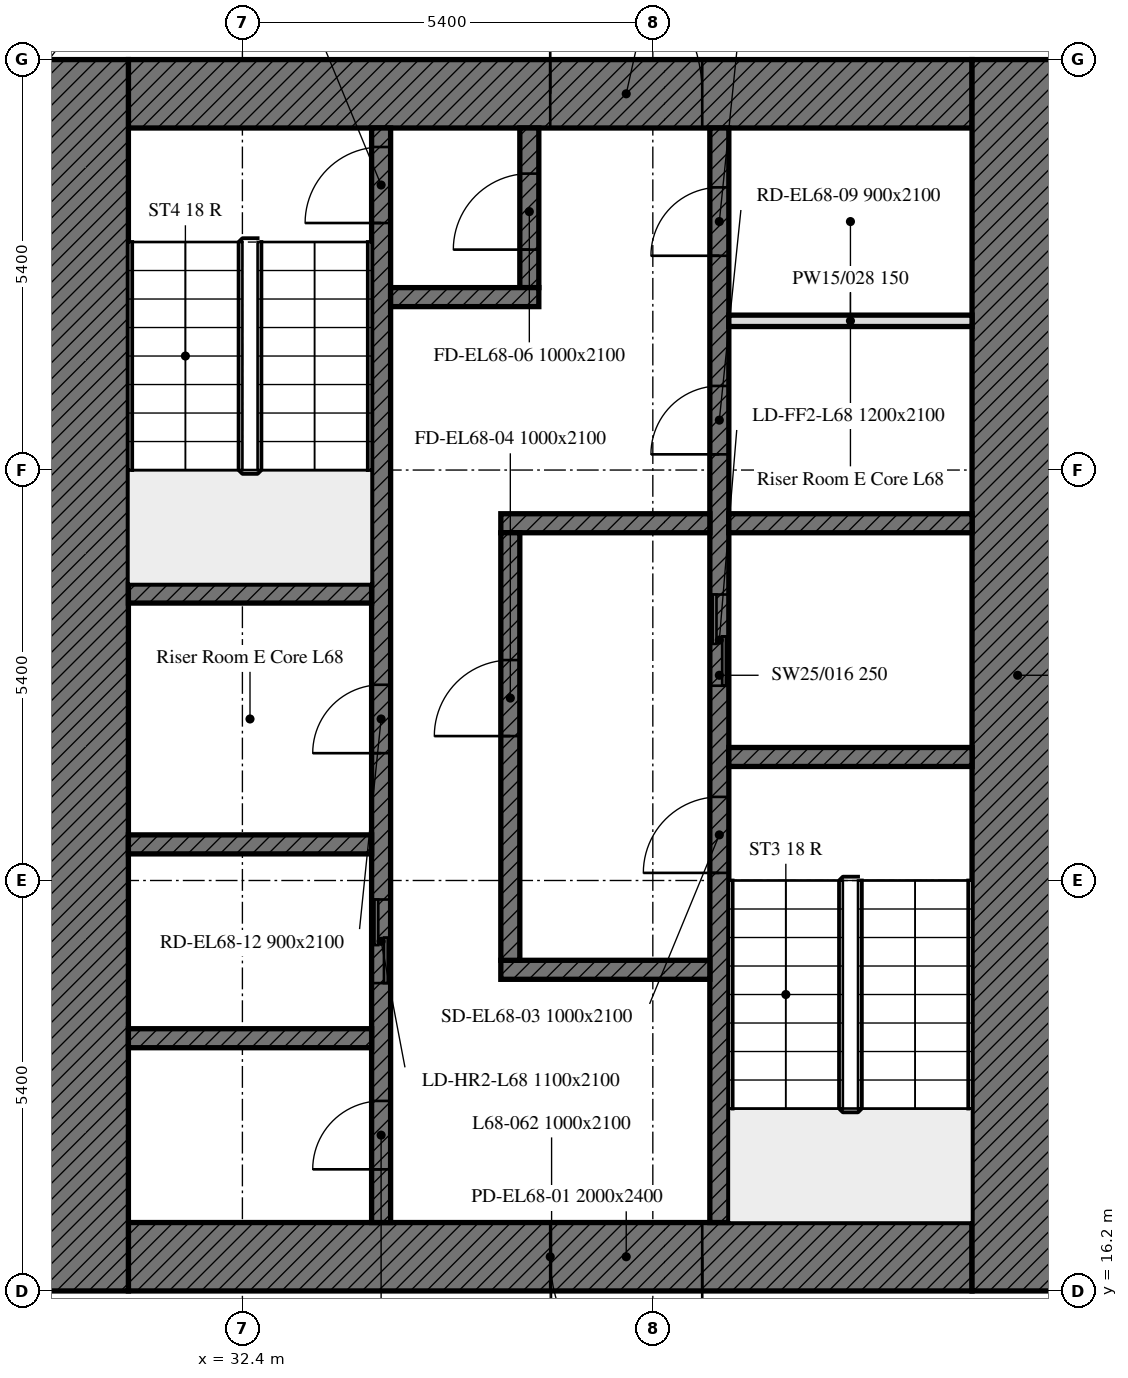
"""IFC4 building model, lengths in metres.
Left out: names, types, materials, properties, quantities, classifications, styles, units other than length and angle.
Written with IfcOpenShell. Run it as: python <this file> out.ifc"""

import sys

from ifc_helpers import new_model, si_unit, direction, frame, frame_2d, origin, place, context, subcontext, project, spatial, rectangle, extrude, element, fill, save


model = new_model("IFC4")
c1 = context("Model", 3, precision=1e-05, world=origin(), true_north=direction((0.0, 1.0)))
c2 = subcontext(c1, "Body", "Model", "MODEL_VIEW")
j1 = project(units=[si_unit("LENGTHUNIT", "METRE"), si_unit("PLANEANGLEUNIT", "RADIAN")], contexts=[c1])
p1 = place(None, origin())
s1 = spatial("IfcSite", under=j1, at=p1, CompositionType="ELEMENT")
p2 = place(p1, origin())
s2 = spatial("IfcBuilding", under=s1, at=p2, CompositionType="ELEMENT")
p3 = place(p2, frame((0.0, 0.0, 278.5)))
s3 = spatial("IfcBuildingStorey", under=s2, at=p3, CompositionType="ELEMENT", Elevation=278.5)
p4 = place(p3, frame((42.0, 16.65, 0.0), z_axis=(0.0, 0.0, 1.0), x_axis=(-1.0, 0.0, 0.0)))
e1 = element("IfcWall", 1, at=p4, inside=s3, PredefinedType="SOLIDWALL", context=c2, shape_type="SweptSolid", body=[
    extrude(rectangle(XDim=11.1, YDim=0.9, at=frame_2d((5.55, 0.0))), origin(), (0.0, 0.0, 1.0), 3.0),
])
p5 = place(p4, frame((3.55, 0.0, 0.0)))
e2 = element("IfcOpeningElement", 2, at=p5, cuts=e1, PredefinedType="OPENING", context=c2, shape_type="SweptSolid", body=[
    extrude(rectangle(XDim=2.0, YDim=2.4, at=frame_2d((1.0, 1.2))), frame((0.0, 0.45, 0.0), z_axis=(0.0, -1.0, 0.0), x_axis=(1.0, 0.0, 0.0)), (0.0, 0.0, 1.0), 0.9),
])
p6 = place(p3, frame((30.9, 31.95, 0.0), z_axis=(0.0, 0.0, 1.0), x_axis=(1.0, 0.0, 0.0)))
e3 = element("IfcWall", 3, at=p6, inside=s3, PredefinedType="SOLIDWALL", context=c2, shape_type="SweptSolid", body=[
    extrude(rectangle(XDim=11.1, YDim=0.9, at=frame_2d((5.55, 0.0))), origin(), (0.0, 0.0, 1.0), 3.0),
])
p7 = place(p6, frame((5.55, 0.0, 0.0)))
e4 = element("IfcOpeningElement", 4, at=p7, cuts=e3, PredefinedType="OPENING", context=c2, shape_type="SweptSolid", body=[
    extrude(rectangle(XDim=2.0, YDim=2.4, at=frame_2d((1.0, 1.2))), frame((0.0, 0.45, 0.0), z_axis=(0.0, -1.0, 0.0), x_axis=(1.0, 0.0, 0.0)), (0.0, 0.0, 1.0), 0.9),
])
for number, where, z_axis, x_axis in (
    (5, (42.6, 32.4, 0.0), (0.0, 0.0, 1.0), (0.0, -1.0, 0.0)),
    (6, (30.3, 16.2, 0.0), (0.0, 0.0, 1.0), (0.0, 1.0, 0.0)),
):
    element("IfcWall", number, at=place(p3, frame(where, z_axis=z_axis, x_axis=x_axis)), inside=s3, PredefinedType="SOLIDWALL", context=c2, shape_type="SweptSolid", body=[
        extrude(rectangle(XDim=16.2, YDim=1.2, at=frame_2d((8.1, 0.0))), origin(), (0.0, 0.0, 1.0), 3.0),
    ])
p8 = place(p3, frame((38.675, 17.1, 0.0), z_axis=(0.0, 0.0, 1.0), x_axis=(0.0, 1.0, 0.0)))
e7 = element("IfcWall", 7, at=p8, inside=s3, PredefinedType="SOLIDWALL", context=c2, shape_type="SweptSolid", body=[
    extrude(rectangle(XDim=14.4, YDim=0.25, at=frame_2d((7.2, 0.0))), origin(), (0.0, 0.0, 1.0), 3.0),
])
p9 = place(p8, frame((4.6, 0.0, 0.0)))
e8 = element("IfcOpeningElement", 8, at=p9, cuts=e7, PredefinedType="OPENING", context=c2, shape_type="SweptSolid", body=[
    extrude(rectangle(XDim=1.0, YDim=2.1, at=frame_2d((0.5, 1.05))), frame((0.0, 0.125, 0.0), z_axis=(0.0, -1.0, 0.0), x_axis=(1.0, 0.0, 0.0)), (0.0, 0.0, 1.0), 0.25),
])
p10 = place(p8, frame((7.062, 0.0, 0.0)))
e9 = element("IfcOpeningElement", 9, at=p10, cuts=e7, PredefinedType="OPENING", context=c2, shape_type="SweptSolid", body=[
    extrude(rectangle(XDim=1.2, YDim=2.1, at=frame_2d((0.6, 1.05))), frame((0.0, 0.125, 0.0), z_axis=(0.0, -1.0, 0.0), x_axis=(1.0, 0.0, 0.0)), (0.0, 0.0, 1.0), 0.25),
])
p11 = place(p8, frame((10.106, 0.0, 0.0)))
e10 = element("IfcOpeningElement", 10, at=p11, cuts=e7, PredefinedType="OPENING", context=c2, shape_type="SweptSolid", body=[
    extrude(rectangle(XDim=0.9, YDim=2.1, at=frame_2d((0.45, 1.05))), frame((0.0, 0.125, 0.0), z_axis=(0.0, -1.0, 0.0), x_axis=(1.0, 0.0, 0.0)), (0.0, 0.0, 1.0), 0.25),
])
p12 = place(p8, frame((12.719, 0.0, 0.0)))
e11 = element("IfcOpeningElement", 11, at=p12, cuts=e7, PredefinedType="OPENING", context=c2, shape_type="SweptSolid", body=[
    extrude(rectangle(XDim=0.9, YDim=2.1, at=frame_2d((0.45, 1.05))), frame((0.0, 0.125, 0.0), z_axis=(0.0, -1.0, 0.0), x_axis=(1.0, 0.0, 0.0)), (0.0, 0.0, 1.0), 0.25),
])
p13 = place(p3, frame((34.225, 17.1, 0.0), z_axis=(0.0, 0.0, 1.0), x_axis=(0.0, 1.0, 0.0)))
e12 = element("IfcWall", 12, at=p13, inside=s3, PredefinedType="SOLIDWALL", context=c2, shape_type="SweptSolid", body=[
    extrude(rectangle(XDim=14.4, YDim=0.25, at=frame_2d((7.2, 0.0))), origin(), (0.0, 0.0, 1.0), 3.0),
])
p14 = place(p13, frame((13.15, 0.0, 0.0)))
e13 = element("IfcOpeningElement", 13, at=p14, cuts=e12, PredefinedType="OPENING", context=c2, shape_type="SweptSolid", body=[
    extrude(rectangle(XDim=1.0, YDim=2.1, at=frame_2d((0.5, 1.05))), frame((0.0, 0.125, 0.0), z_axis=(0.0, -1.0, 0.0), x_axis=(1.0, 0.0, 0.0)), (0.0, 0.0, 1.0), 0.25),
])
p15 = place(p13, frame((3.15, 0.0, 0.0)))
e14 = element("IfcOpeningElement", 14, at=p15, cuts=e12, PredefinedType="OPENING", context=c2, shape_type="SweptSolid", body=[
    extrude(rectangle(XDim=1.1, YDim=2.1, at=frame_2d((0.55, 1.05))), frame((0.0, 0.125, 0.0), z_axis=(0.0, -1.0, 0.0), x_axis=(1.0, 0.0, 0.0)), (0.0, 0.0, 1.0), 0.25),
])
p16 = place(p13, frame((0.7, 0.0, 0.0)))
e15 = element("IfcOpeningElement", 15, at=p16, cuts=e12, PredefinedType="OPENING", context=c2, shape_type="SweptSolid", body=[
    extrude(rectangle(XDim=0.9, YDim=2.1, at=frame_2d((0.45, 1.05))), frame((0.0, 0.125, 0.0), z_axis=(0.0, -1.0, 0.0), x_axis=(1.0, 0.0, 0.0)), (0.0, 0.0, 1.0), 0.25),
])
p17 = place(p13, frame((6.175, 0.0, 0.0)))
e16 = element("IfcOpeningElement", 16, at=p17, cuts=e12, PredefinedType="OPENING", context=c2, shape_type="SweptSolid", body=[
    extrude(rectangle(XDim=0.9, YDim=2.1, at=frame_2d((0.45, 1.05))), frame((0.0, 0.125, 0.0), z_axis=(0.0, -1.0, 0.0), x_axis=(1.0, 0.0, 0.0)), (0.0, 0.0, 1.0), 0.25),
])
p18 = place(p3, frame((38.8, 23.225, 0.0), z_axis=(0.0, 0.0, 1.0), x_axis=(1.0, 0.0, 0.0)))
e17 = element("IfcWall", 17, at=p18, inside=s3, PredefinedType="SOLIDWALL", context=c2, shape_type="SweptSolid", body=[
    extrude(rectangle(XDim=3.2, YDim=0.25, at=frame_2d((1.6, 0.0))), origin(), (0.0, 0.0, 1.0), 3.0),
])
for number, where, z_axis, x_axis in (
    (18, (30.9, 25.375, 0.0), (0.0, 0.0, 1.0), (1.0, 0.0, 0.0)),
    (19, (30.9, 22.075, 0.0), (0.0, 0.0, 1.0), (1.0, 0.0, 0.0)),
):
    element("IfcWall", number, at=place(p3, frame(where, z_axis=z_axis, x_axis=x_axis)), inside=s3, PredefinedType="SOLIDWALL", context=c2, shape_type="SweptSolid", body=[
        extrude(rectangle(XDim=3.2, YDim=0.25, at=frame_2d((1.6, 0.0))), origin(), (0.0, 0.0, 1.0), 3.0),
    ])
p19 = place(p3, frame((38.8, 26.3, 0.0), z_axis=(0.0, 0.0, 1.0), x_axis=(1.0, 0.0, 0.0)))
e20 = element("IfcWall", 20, at=p19, inside=s3, PredefinedType="SOLIDWALL", context=c2, shape_type="SweptSolid", body=[
    extrude(rectangle(XDim=3.2, YDim=0.25, at=frame_2d((1.6, 0.0))), origin(), (0.0, 0.0, 1.0), 3.0),
])
for number, where, z_axis, x_axis in (
    (21, (35.8, 26.3, 0.0), (0.0, 0.0, 1.0), (1.0, 0.0, 0.0)),
    (22, (35.8, 20.425, 0.0), (0.0, 0.0, 1.0), (1.0, 0.0, 0.0)),
):
    element("IfcWall", number, at=place(p3, frame(where, z_axis=z_axis, x_axis=x_axis)), inside=s3, PredefinedType="SOLIDWALL", context=c2, shape_type="SweptSolid", body=[
        extrude(rectangle(XDim=2.75, YDim=0.25, at=frame_2d((1.375, 0.0))), origin(), (0.0, 0.0, 1.0), 3.0),
    ])
p20 = place(p3, frame((36.175, 29.4, 0.0), z_axis=(0.0, 0.0, 1.0), x_axis=(0.0, 1.0, 0.0)))
e23 = element("IfcWall", 23, at=p20, inside=s3, PredefinedType="SOLIDWALL", context=c2, shape_type="SweptSolid", body=[
    extrude(rectangle(XDim=2.1, YDim=0.25, at=frame_2d((1.05, 0.0))), origin(), (0.0, 0.0, 1.0), 3.0),
])
p21 = place(p20, frame((0.5, 0.0, 0.0)))
e24 = element("IfcOpeningElement", 24, at=p21, cuts=e23, PredefinedType="OPENING", context=c2, shape_type="SweptSolid", body=[
    extrude(rectangle(XDim=1.0, YDim=2.1, at=frame_2d((0.5, 1.05))), frame((0.0, 0.125, 0.0), z_axis=(0.0, -1.0, 0.0), x_axis=(1.0, 0.0, 0.0)), (0.0, 0.0, 1.0), 0.25),
])
p22 = place(p3, frame((34.35, 29.275, 0.0), z_axis=(0.0, 0.0, 1.0), x_axis=(1.0, 0.0, 0.0)))
e25 = element("IfcWall", 25, at=p22, inside=s3, PredefinedType="SOLIDWALL", context=c2, shape_type="SweptSolid", body=[
    extrude(rectangle(XDim=1.95, YDim=0.25, at=frame_2d((0.975, 0.0))), origin(), (0.0, 0.0, 1.0), 3.0),
])
p23 = place(p3, frame((35.925, 20.55, 0.0), z_axis=(0.0, 0.0, 1.0), x_axis=(0.0, 1.0, 0.0)))
e26 = element("IfcWall", 26, at=p23, inside=s3, PredefinedType="SOLIDWALL", context=c2, shape_type="SweptSolid", body=[
    extrude(rectangle(XDim=5.625, YDim=0.25, at=frame_2d((2.812, 0.0))), origin(), (0.0, 0.0, 1.0), 3.0),
])
p24 = place(p23, frame((2.95, 0.0, 0.0)))
e27 = element("IfcOpeningElement", 27, at=p24, cuts=e26, PredefinedType="OPENING", context=c2, shape_type="SweptSolid", body=[
    extrude(rectangle(XDim=1.0, YDim=2.1, at=frame_2d((0.5, 1.05))), frame((0.0, 0.125, 0.0), z_axis=(0.0, -1.0, 0.0), x_axis=(1.0, 0.0, 0.0)), (0.0, 0.0, 1.0), 0.25),
])
p25 = place(p3, frame((30.9, 19.525, 0.0), z_axis=(0.0, 0.0, 1.0), x_axis=(1.0, 0.0, 0.0)))
e28 = element("IfcWall", 28, at=p25, inside=s3, PredefinedType="SOLIDWALL", context=c2, shape_type="SweptSolid", body=[
    extrude(rectangle(XDim=3.2, YDim=0.25, at=frame_2d((1.6, 0.0))), origin(), (0.0, 0.0, 1.0), 3.0),
])
p26 = place(p3, frame((38.8, 28.963, 0.0), z_axis=(0.0, 0.0, 1.0), x_axis=(1.0, 0.0, 0.0)))
e29 = element("IfcWall", 29, at=p26, inside=s3, PredefinedType="PARTITIONING", context=c2, shape_type="SweptSolid", body=[
    extrude(rectangle(XDim=3.2, YDim=0.15, at=frame_2d((1.6, 0.0))), origin(), (0.0, 0.0, 1.0), 3.0),
])
p27 = place(p5, origin())
e30 = element("IfcDoor", 30, at=p27, inside=s3, OperationType="DOUBLE_DOOR_SINGLE_SWING", PredefinedType="DOOR", context=c2, shape_type="SweptSolid", body=[
    extrude(rectangle(XDim=2.0, YDim=2.4, at=frame_2d((1.0, 1.2))), frame((0.0, 0.025, 0.0), z_axis=(0.0, -1.0, 0.0), x_axis=(1.0, 0.0, 0.0)), (0.0, 0.0, 1.0), 0.05),
])
fill(e2, e30)
p28 = place(p7, origin())
e31 = element("IfcDoor", 31, at=p28, inside=s3, OperationType="DOUBLE_DOOR_SINGLE_SWING", PredefinedType="DOOR", context=c2, shape_type="SweptSolid", body=[
    extrude(rectangle(XDim=2.0, YDim=2.4, at=frame_2d((1.0, 1.2))), frame((0.0, 0.025, 0.0), z_axis=(0.0, -1.0, 0.0), x_axis=(1.0, 0.0, 0.0)), (0.0, 0.0, 1.0), 0.05),
])
fill(e4, e31)
p29 = place(p9, origin())
e32 = element("IfcDoor", 32, at=p29, inside=s3, OperationType="SINGLE_SWING_LEFT", PredefinedType="DOOR", context=c2, shape_type="SweptSolid", body=[
    extrude(rectangle(XDim=1.0, YDim=2.1, at=frame_2d((0.5, 1.05))), frame((0.0, 0.025, 0.0), z_axis=(0.0, -1.0, 0.0), x_axis=(1.0, 0.0, 0.0)), (0.0, 0.0, 1.0), 0.05),
])
fill(e8, e32)
p30 = place(p24, origin())
e33 = element("IfcDoor", 33, at=p30, inside=s3, OperationType="SINGLE_SWING_LEFT", PredefinedType="DOOR", context=c2, shape_type="SweptSolid", body=[
    extrude(rectangle(XDim=1.0, YDim=2.1, at=frame_2d((0.5, 1.05))), frame((0.0, 0.025, 0.0), z_axis=(0.0, -1.0, 0.0), x_axis=(1.0, 0.0, 0.0)), (0.0, 0.0, 1.0), 0.05),
])
fill(e27, e33)
p31 = place(p14, origin())
e34 = element("IfcDoor", 34, at=p31, inside=s3, OperationType="SINGLE_SWING_LEFT", PredefinedType="DOOR", context=c2, shape_type="SweptSolid", body=[
    extrude(rectangle(XDim=1.0, YDim=2.1, at=frame_2d((0.5, 1.05))), frame((0.0, 0.025, 0.0), z_axis=(0.0, -1.0, 0.0), x_axis=(1.0, 0.0, 0.0)), (0.0, 0.0, 1.0), 0.05),
])
fill(e13, e34)
p32 = place(p21, origin())
e35 = element("IfcDoor", 35, at=p32, inside=s3, OperationType="SINGLE_SWING_LEFT", PredefinedType="DOOR", context=c2, shape_type="SweptSolid", body=[
    extrude(rectangle(XDim=1.0, YDim=2.1, at=frame_2d((0.5, 1.05))), frame((0.0, 0.025, 0.0), z_axis=(0.0, -1.0, 0.0), x_axis=(1.0, 0.0, 0.0)), (0.0, 0.0, 1.0), 0.05),
])
fill(e24, e35)
p33 = place(p10, origin())
e36 = element("IfcDoor", 36, at=p33, inside=s3, OperationType="DOUBLE_DOOR_SLIDING", PredefinedType="DOOR", context=c2, shape_type="SweptSolid", body=[
    extrude(rectangle(XDim=1.2, YDim=2.1, at=frame_2d((0.6, 1.05))), frame((0.0, 0.025, 0.0), z_axis=(0.0, -1.0, 0.0), x_axis=(1.0, 0.0, 0.0)), (0.0, 0.0, 1.0), 0.05),
])
fill(e9, e36)
p34 = place(p15, origin())
e37 = element("IfcDoor", 37, at=p34, inside=s3, OperationType="DOUBLE_DOOR_SLIDING", PredefinedType="DOOR", context=c2, shape_type="SweptSolid", body=[
    extrude(rectangle(XDim=1.1, YDim=2.1, at=frame_2d((0.55, 1.05))), frame((0.0, 0.025, 0.0), z_axis=(0.0, -1.0, 0.0), x_axis=(1.0, 0.0, 0.0)), (0.0, 0.0, 1.0), 0.05),
])
fill(e14, e37)
p35 = place(p11, origin())
e38 = element("IfcDoor", 38, at=p35, inside=s3, OperationType="SINGLE_SWING_LEFT", PredefinedType="DOOR", context=c2, shape_type="SweptSolid", body=[
    extrude(rectangle(XDim=0.9, YDim=2.1, at=frame_2d((0.45, 1.05))), frame((0.0, 0.025, 0.0), z_axis=(0.0, -1.0, 0.0), x_axis=(1.0, 0.0, 0.0)), (0.0, 0.0, 1.0), 0.05),
])
fill(e10, e38)
p36 = place(p12, origin())
e39 = element("IfcDoor", 39, at=p36, inside=s3, OperationType="SINGLE_SWING_LEFT", PredefinedType="DOOR", context=c2, shape_type="SweptSolid", body=[
    extrude(rectangle(XDim=0.9, YDim=2.1, at=frame_2d((0.45, 1.05))), frame((0.0, 0.025, 0.0), z_axis=(0.0, -1.0, 0.0), x_axis=(1.0, 0.0, 0.0)), (0.0, 0.0, 1.0), 0.05),
])
fill(e11, e39)
p37 = place(p16, origin())
e40 = element("IfcDoor", 40, at=p37, inside=s3, OperationType="SINGLE_SWING_LEFT", PredefinedType="DOOR", context=c2, shape_type="SweptSolid", body=[
    extrude(rectangle(XDim=0.9, YDim=2.1, at=frame_2d((0.45, 1.05))), frame((0.0, 0.025, 0.0), z_axis=(0.0, -1.0, 0.0), x_axis=(1.0, 0.0, 0.0)), (0.0, 0.0, 1.0), 0.05),
])
fill(e15, e40)
p38 = place(p17, origin())
e41 = element("IfcDoor", 41, at=p38, inside=s3, OperationType="SINGLE_SWING_LEFT", PredefinedType="DOOR", context=c2, shape_type="SweptSolid", body=[
    extrude(rectangle(XDim=0.9, YDim=2.1, at=frame_2d((0.45, 1.05))), frame((0.0, 0.025, 0.0), z_axis=(0.0, -1.0, 0.0), x_axis=(1.0, 0.0, 0.0)), (0.0, 0.0, 1.0), 0.05),
])
fill(e16, e41)
save(model, sys.argv[1])
